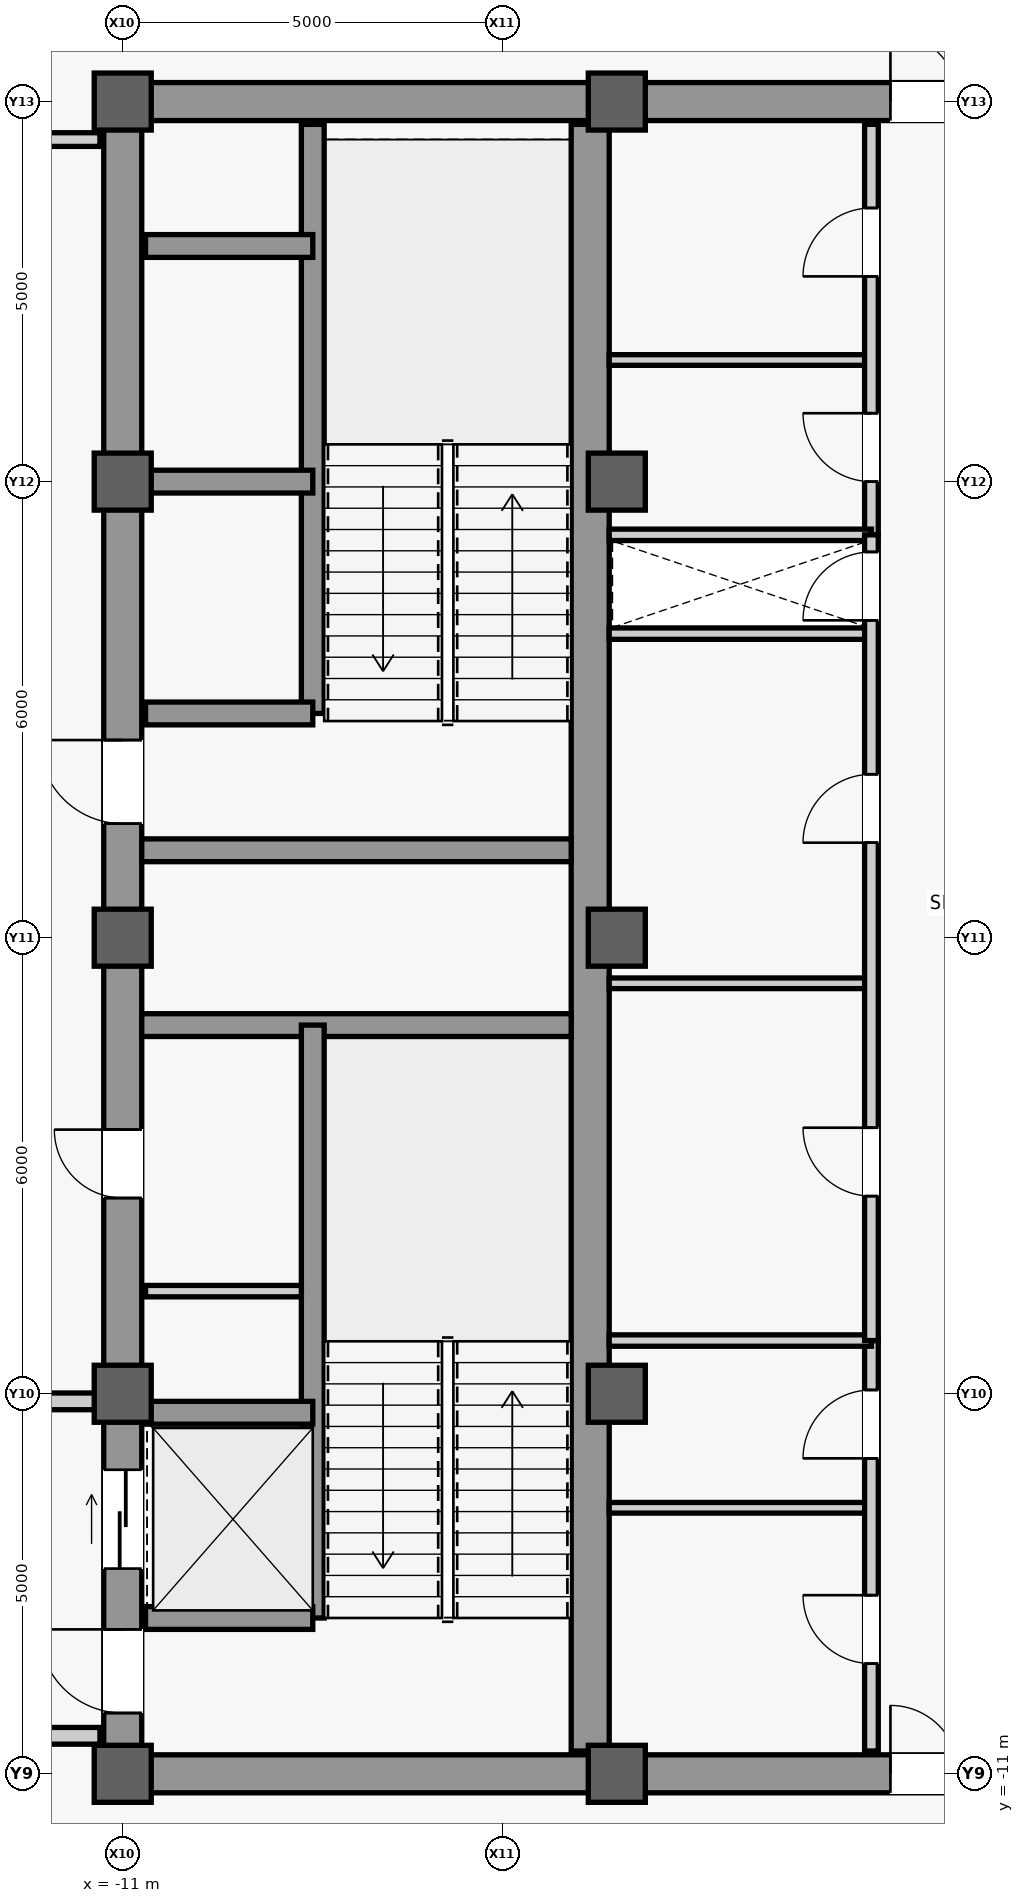
"""IFC4 building model, lengths in metres.
Left out: names, types, materials, properties, quantities, classifications, styles, units other than length and angle.
Written with IfcOpenShell. Run it as: python <this file> out.ifc"""

import sys

from ifc_helpers import new_model, si_unit, direction, frame, frame_2d, origin, origin_2d, place, context, subcontext, project, spatial, rectangle, extrude, source, transform, mapped, element, fill, save


model = new_model("IFC4")
c1 = context("Model", 3, precision=1e-05, world=origin(), true_north=direction((0.0, 1.0)))
c2 = subcontext(c1, "Body", "Model", "MODEL_VIEW")
j1 = project(units=[si_unit("LENGTHUNIT", "METRE"), si_unit("PLANEANGLEUNIT", "RADIAN")], contexts=[c1])
p1 = place(None, origin())
s1 = spatial("IfcSite", under=j1, at=p1, CompositionType="ELEMENT")
p2 = place(p1, origin())
s2 = spatial("IfcBuilding", under=s1, at=p2, CompositionType="ELEMENT")
p3 = place(p2, frame((0.0, 0.0, 394.7)))
s3 = spatial("IfcBuildingStorey", under=s2, at=p3, CompositionType="ELEMENT", Elevation=394.7)
m1 = source(origin(), c2, "Body", "SweptSolid", [
    extrude(rectangle(XDim=22.0, YDim=0.5, at=frame_2d((11.0, 0.0))), origin(), (0.0, 0.0, 1.0), 4.45),
])
p4 = place(p3, frame((-11.0, -11.0, 0.0), z_axis=(0.0, 0.0, 1.0), x_axis=(0.0, 1.0, 0.0)))
e1 = element("IfcWall", 1, at=p4, inside=s3, PredefinedType="SHEAR", context=c2, shape_type="MappedRepresentation", body=[
    mapped(m1, transform((0.0, 0.0, 0.0), scale=1.0)),
])
m2 = source(origin(), c2, "Body", "SweptSolid", [
    extrude(rectangle(XDim=1.1, YDim=2.2, at=frame_2d((0.55, 1.1))), frame((0.0, 0.26, 0.0), z_axis=(0.0, -1.0, 0.0), x_axis=(1.0, 0.0, 0.0)), (0.0, 0.0, 1.0), 0.52),
])
p5 = place(p4, frame((0.8, 0.0, 0.0)))
e2 = element("IfcOpeningElement", 2, at=p5, cuts=e1, PredefinedType="OPENING", context=c2, shape_type="MappedRepresentation", body=[
    mapped(m2, transform((0.0, 0.0, 0.0), scale=1.0)),
])
p6 = place(p4, frame((12.5, 0.0, 0.0)))
e3 = element("IfcOpeningElement", 3, at=p6, cuts=e1, PredefinedType="OPENING", context=c2, shape_type="MappedRepresentation", body=[
    mapped(m2, transform((0.0, 0.0, 0.0), scale=1.0)),
])
m3 = source(origin(), c2, "Body", "SweptSolid", [
    extrude(rectangle(XDim=0.9, YDim=2.15, at=frame_2d((0.45, 1.075))), frame((0.0, 0.26, 0.0), z_axis=(0.0, -1.0, 0.0), x_axis=(1.0, 0.0, 0.0)), (0.0, 0.0, 1.0), 0.52),
])
p7 = place(p4, frame((7.575, 0.0, 0.0)))
e4 = element("IfcOpeningElement", 4, at=p7, cuts=e1, PredefinedType="OPENING", context=c2, shape_type="MappedRepresentation", body=[
    mapped(m3, transform((0.0, 0.0, 0.0), scale=1.0)),
])
m4 = source(origin(), c2, "Body", "SweptSolid", [
    extrude(rectangle(XDim=1.3, YDim=2.3, at=frame_2d((0.65, 1.15))), frame((0.0, 0.26, 0.0), z_axis=(0.0, -1.0, 0.0), x_axis=(1.0, 0.0, 0.0)), (0.0, 0.0, 1.0), 0.52),
])
p8 = place(p4, frame((2.7, 0.0, 0.0)))
e5 = element("IfcOpeningElement", 5, at=p8, cuts=e1, PredefinedType="OPENING", context=c2, shape_type="MappedRepresentation", body=[
    mapped(m4, transform((0.0, 0.0, 0.0), scale=1.0)),
])
m5 = source(origin(), c2, "Body", "SweptSolid", [
    extrude(rectangle(XDim=21.4, YDim=0.5, at=frame_2d((10.7, 0.0))), origin(), (0.0, 0.0, 1.0), 4.45),
])
p9 = place(p3, frame((-4.85, -10.7, 0.0), z_axis=(0.0, 0.0, 1.0), x_axis=(0.0, 1.0, 0.0)))
e6 = element("IfcWall", 6, at=p9, inside=s3, PredefinedType="SHEAR", context=c2, shape_type="MappedRepresentation", body=[
    mapped(m5, transform((0.0, 0.0, 0.0), scale=1.0)),
])
m6 = source(origin(), c2, "Body", "SweptSolid", [
    extrude(rectangle(XDim=5.9, YDim=0.5, at=frame_2d((2.95, 0.0))), origin(), (0.0, 0.0, 1.0), 4.45),
])
for number, where, z_axis, x_axis in (
    (7, (-10.75, -11.0, 0.0), (0.0, 0.0, 1.0), (1.0, 0.0, 0.0)),
    (8, (-10.75, 11.0, 0.0), (0.0, 0.0, 1.0), (1.0, 0.0, 0.0)),
):
    element("IfcWall", number, at=place(p3, frame(where, z_axis=z_axis, x_axis=x_axis)), inside=s3, PredefinedType="SHEAR", context=c2, shape_type="MappedRepresentation", body=[
        mapped(m6, transform((0.0, 0.0, 0.0), scale=1.0)),
    ])
m7 = source(origin(), c2, "Body", "SweptSolid", [
    extrude(rectangle(XDim=5.65, YDim=0.3, at=frame_2d((2.825, 0.0))), origin(), (0.0, 0.0, 1.0), 4.45),
])
for number, where, z_axis, x_axis in (
    (9, (-10.75, -1.15, 0.0), (0.0, 0.0, 1.0), (1.0, 0.0, 0.0)),
    (10, (-10.75, 1.15, 0.0), (0.0, 0.0, 1.0), (1.0, 0.0, 0.0)),
):
    element("IfcWall", number, at=place(p3, frame(where, z_axis=z_axis, x_axis=x_axis)), inside=s3, PredefinedType="SHEAR", context=c2, shape_type="MappedRepresentation", body=[
        mapped(m7, transform((0.0, 0.0, 0.0), scale=1.0)),
    ])
m8 = source(origin(), c2, "Body", "SweptSolid", [
    extrude(rectangle(XDim=9.2, YDim=0.5, at=frame_2d((4.6, 0.0))), origin(), (0.0, 0.0, 1.0), 4.45),
])
p10 = place(p3, frame((-4.6, -11.0, 0.0), z_axis=(0.0, 0.0, 1.0), x_axis=(1.0, 0.0, 0.0)))
e11 = element("IfcWall", 11, at=p10, inside=s3, PredefinedType="SHEAR", context=c2, shape_type="MappedRepresentation", body=[
    mapped(m8, transform((0.0, 0.0, 0.0), scale=1.0)),
])
m9 = source(origin(), c2, "Body", "SweptSolid", [
    extrude(rectangle(XDim=1.8, YDim=2.25, at=frame_2d((0.9, 1.125))), frame((0.0, 0.26, 0.0), z_axis=(0.0, -1.0, 0.0), x_axis=(1.0, 0.0, 0.0)), (0.0, 0.0, 1.0), 0.52),
])
p11 = place(p10, frame((3.7, 0.0, 0.0)))
e12 = element("IfcOpeningElement", 12, at=p11, cuts=e11, PredefinedType="OPENING", context=c2, shape_type="MappedRepresentation", body=[
    mapped(m9, transform((0.0, 0.0, 0.0), scale=1.0)),
])
p12 = place(p3, frame((-4.6, 11.0, 0.0), z_axis=(0.0, 0.0, 1.0), x_axis=(1.0, 0.0, 0.0)))
e13 = element("IfcWall", 13, at=p12, inside=s3, PredefinedType="SHEAR", context=c2, shape_type="MappedRepresentation", body=[
    mapped(m8, transform((0.0, 0.0, 0.0), scale=1.0)),
])
p13 = place(p12, frame((3.7, 0.0, 0.0)))
e14 = element("IfcOpeningElement", 14, at=p13, cuts=e13, PredefinedType="OPENING", context=c2, shape_type="MappedRepresentation", body=[
    mapped(m9, transform((0.0, 0.0, 0.0), scale=1.0)),
])
m10 = source(origin(), c2, "Body", "SweptSolid", [
    extrude(rectangle(XDim=0.75, YDim=0.75, at=origin_2d()), origin(), (0.0, 0.0, 1.0), 4.8),
])
for number, where, z_axis, x_axis in (
    (15, (-11.0, -11.0, 0.0), (0.0, 0.0, 1.0), (1.0, 0.0, 0.0)),
    (16, (-11.0, -6.0, 0.0), (0.0, 0.0, 1.0), (1.0, 0.0, 0.0)),
    (17, (-11.0, 0.0, 0.0), (0.0, 0.0, 1.0), (1.0, 0.0, 0.0)),
    (18, (-11.0, 6.0, 0.0), (0.0, 0.0, 1.0), (1.0, 0.0, 0.0)),
    (19, (-11.0, 11.0, 0.0), (0.0, 0.0, 1.0), (1.0, 0.0, 0.0)),
    (20, (-4.5, -11.0, 0.0), (0.0, 0.0, 1.0), (1.0, 0.0, 0.0)),
    (21, (-4.5, -6.0, 0.0), (0.0, 0.0, 1.0), (1.0, 0.0, 0.0)),
    (22, (-4.5, 0.0, 0.0), (0.0, 0.0, 1.0), (1.0, 0.0, 0.0)),
    (23, (-4.5, 6.0, 0.0), (0.0, 0.0, 1.0), (1.0, 0.0, 0.0)),
    (24, (-4.5, 11.0, 0.0), (0.0, 0.0, 1.0), (1.0, 0.0, 0.0)),
):
    element("IfcColumn", number, at=place(p3, frame(where, z_axis=z_axis, x_axis=x_axis)), inside=s3, PredefinedType="COLUMN", context=c2, shape_type="MappedRepresentation", body=[
        mapped(m10, transform((0.0, 0.0, 0.0), scale=1.0)),
    ])
m11 = source(origin(), c2, "Body", "SweptSolid", [
    extrude(rectangle(XDim=7.8, YDim=0.3, at=frame_2d((3.9, 0.0))), origin(), (0.0, 0.0, 1.0), 4.45),
])
p14 = place(p3, frame((-8.5, -8.95, 0.0), z_axis=(0.0, 0.0, 1.0), x_axis=(0.0, 1.0, 0.0)))
e25 = element("IfcWall", 25, at=p14, inside=s3, PredefinedType="SHEAR", context=c2, shape_type="MappedRepresentation", body=[
    mapped(m11, transform((0.0, 0.0, 0.0), scale=1.0)),
])
m12 = source(origin(), c2, "Body", "SweptSolid", [
    extrude(rectangle(XDim=2.2, YDim=0.3, at=frame_2d((1.1, 0.0))), origin(), (0.0, 0.0, 1.0), 4.45),
])
for number, where, z_axis, x_axis in (
    (26, (-10.7, -8.95, 0.0), (0.0, 0.0, 1.0), (1.0, 0.0, 0.0)),
    (27, (-10.7, -6.25, 0.0), (0.0, 0.0, 1.0), (1.0, 0.0, 0.0)),
):
    element("IfcWall", number, at=place(p3, frame(where, z_axis=z_axis, x_axis=x_axis)), inside=s3, PredefinedType="SHEAR", context=c2, shape_type="MappedRepresentation", body=[
        mapped(m12, transform((0.0, 0.0, 0.0), scale=1.0)),
    ])
m13 = source(origin(), c2, "Body", "SweptSolid", [
    extrude(rectangle(XDim=7.75, YDim=0.3, at=frame_2d((3.875, 0.0))), origin(), (0.0, 0.0, 1.0), 4.45),
])
p15 = place(p3, frame((-8.5, 2.95, 0.0), z_axis=(0.0, 0.0, 1.0), x_axis=(0.0, 1.0, 0.0)))
e28 = element("IfcWall", 28, at=p15, inside=s3, PredefinedType="SHEAR", context=c2, shape_type="MappedRepresentation", body=[
    mapped(m13, transform((0.0, 0.0, 0.0), scale=1.0)),
])
for number, where, z_axis, x_axis in (
    (29, (-10.7, 2.95, 0.0), (0.0, 0.0, 1.0), (1.0, 0.0, 0.0)),
    (30, (-10.7, 6.0, 0.0), (0.0, 0.0, 1.0), (1.0, 0.0, 0.0)),
    (31, (-10.7, 9.1, 0.0), (0.0, 0.0, 1.0), (1.0, 0.0, 0.0)),
):
    element("IfcWall", number, at=place(p3, frame(where, z_axis=z_axis, x_axis=x_axis)), inside=s3, PredefinedType="SHEAR", context=c2, shape_type="MappedRepresentation", body=[
        mapped(m12, transform((0.0, 0.0, 0.0), scale=1.0)),
    ])
m14 = source(origin(), c2, "Body", "SweptSolid", [
    extrude(rectangle(XDim=2.05, YDim=0.15, at=frame_2d((1.025, 0.0))), origin(), (0.0, 0.0, 1.0), 4.45),
])
p16 = place(p3, frame((-10.7, -4.65, 0.0), z_axis=(0.0, 0.0, 1.0), x_axis=(1.0, 0.0, 0.0)))
e32 = element("IfcWall", 32, at=p16, inside=s3, PredefinedType="PARTITIONING", context=c2, shape_type="MappedRepresentation", body=[
    mapped(m14, transform((0.0, 0.0, 0.0), scale=1.0)),
])
m15 = source(origin(), c2, "Body", "SweptSolid", [
    extrude(rectangle(XDim=4.05, YDim=0.22, at=frame_2d((2.025, 0.0))), origin(), (0.0, 0.0, 1.0), 4.45),
])
p17 = place(p3, frame((-15.35, -10.5, 0.0), z_axis=(0.0, 0.0, 1.0), x_axis=(1.0, 0.0, 0.0)))
e33 = element("IfcWall", 33, at=p17, inside=s3, PredefinedType="PARTITIONING", context=c2, shape_type="MappedRepresentation", body=[
    mapped(m15, transform((0.0, 0.0, 0.0), scale=1.0)),
])
m16 = source(origin(), c2, "Body", "SweptSolid", [
    extrude(rectangle(XDim=4.05, YDim=0.22, at=frame_2d((2.025, 0.0))), origin(), (0.0, 0.0, 1.0), 3.901),
])
p18 = place(p3, frame((-15.35, -6.1, 0.0), z_axis=(0.0, 0.0, 1.0), x_axis=(1.0, 0.0, 0.0)))
e34 = element("IfcWall", 34, at=p18, inside=s3, PredefinedType="PARTITIONING", context=c2, shape_type="MappedRepresentation", body=[
    mapped(m16, transform((0.0, 0.0, 0.0), scale=1.0)),
])
m17 = source(origin(), c2, "Body", "SweptSolid", [
    extrude(rectangle(XDim=4.05, YDim=0.18, at=frame_2d((2.025, 0.0))), origin(), (0.0, 0.0, 1.0), 4.45),
])
p19 = place(p3, frame((-15.35, 10.5, 0.0), z_axis=(0.0, 0.0, 1.0), x_axis=(1.0, 0.0, 0.0)))
e35 = element("IfcWall", 35, at=p19, inside=s3, PredefinedType="PARTITIONING", context=c2, shape_type="MappedRepresentation", body=[
    mapped(m17, transform((0.0, 0.0, 0.0), scale=1.0)),
])
m18 = source(origin(), c2, "Body", "SweptSolid", [
    extrude(rectangle(XDim=3.45, YDim=0.15, at=frame_2d((1.725, 0.0))), origin(), (0.0, 0.0, 1.0), 4.45),
])
p20 = place(p3, frame((-4.6, 4.0, 0.0), z_axis=(0.0, 0.0, 1.0), x_axis=(1.0, 0.0, 0.0)))
e36 = element("IfcWall", 36, at=p20, inside=s3, PredefinedType="PARTITIONING", context=c2, shape_type="MappedRepresentation", body=[
    mapped(m18, transform((0.0, 0.0, 0.0), scale=1.0)),
])
m19 = source(origin(), c2, "Body", "SweptSolid", [
    extrude(rectangle(XDim=3.45, YDim=0.14, at=frame_2d((1.725, 0.0))), origin(), (0.0, 0.0, 1.0), 4.45),
])
p21 = place(p3, frame((-4.6, -7.5, 0.0), z_axis=(0.0, 0.0, 1.0), x_axis=(1.0, 0.0, 0.0)))
e37 = element("IfcWall", 37, at=p21, inside=s3, PredefinedType="PARTITIONING", context=c2, shape_type="MappedRepresentation", body=[
    mapped(m19, transform((0.0, 0.0, 0.0), scale=1.0)),
])
m20 = source(origin(), c2, "Body", "SweptSolid", [
    extrude(rectangle(XDim=5.4, YDim=0.18, at=frame_2d((2.7, 0.0))), origin(), (0.0, 0.0, 1.0), 4.45),
])
p22 = place(p3, frame((-1.15, -10.7, 0.0), z_axis=(0.0, 0.0, 1.0), x_axis=(0.0, 1.0, 0.0)))
e38 = element("IfcWall", 38, at=p22, inside=s3, PredefinedType="PARTITIONING", context=c2, shape_type="MappedRepresentation", body=[
    mapped(m20, transform((0.0, 0.0, 0.0), scale=1.0)),
])
m21 = source(origin(), c2, "Body", "SweptSolid", [
    extrude(rectangle(XDim=0.9, YDim=2.15, at=frame_2d((0.45, 1.075))), frame((0.0, 0.1, 0.0), z_axis=(0.0, -1.0, 0.0), x_axis=(1.0, 0.0, 0.0)), (0.0, 0.0, 1.0), 0.2),
])
p23 = place(p22, frame((1.15, 0.0, 0.0)))
e39 = element("IfcOpeningElement", 39, at=p23, cuts=e38, PredefinedType="OPENING", context=c2, shape_type="MappedRepresentation", body=[
    mapped(m21, transform((0.0, 0.0, 0.0), scale=1.0)),
])
p24 = place(p22, frame((3.85, 0.0, 0.0)))
e40 = element("IfcOpeningElement", 40, at=p24, cuts=e38, PredefinedType="OPENING", context=c2, shape_type="MappedRepresentation", body=[
    mapped(m21, transform((0.0, 0.0, 0.0), scale=1.0)),
])
p25 = place(p3, frame((-4.6, -5.3, 0.0), z_axis=(0.0, 0.0, 1.0), x_axis=(1.0, 0.0, 0.0)))
e41 = element("IfcWall", 41, at=p25, inside=s3, PredefinedType="PARTITIONING", context=c2, shape_type="MappedRepresentation", body=[
    mapped(m18, transform((0.0, 0.0, 0.0), scale=1.0)),
])
p26 = place(p3, frame((-4.6, 7.6, 0.0), z_axis=(0.0, 0.0, 1.0), x_axis=(1.0, 0.0, 0.0)))
e42 = element("IfcWall", 42, at=p26, inside=s3, PredefinedType="PARTITIONING", context=c2, shape_type="MappedRepresentation", body=[
    mapped(m19, transform((0.0, 0.0, 0.0), scale=1.0)),
])
p27 = place(p3, frame((-1.15, 5.3, 0.0), z_axis=(0.0, 0.0, 1.0), x_axis=(0.0, 1.0, 0.0)))
e43 = element("IfcWall", 43, at=p27, inside=s3, PredefinedType="PARTITIONING", context=c2, shape_type="MappedRepresentation", body=[
    mapped(m20, transform((0.0, 0.0, 0.0), scale=1.0)),
])
p28 = place(p27, frame((0.7, 0.0, 0.0)))
e44 = element("IfcOpeningElement", 44, at=p28, cuts=e43, PredefinedType="OPENING", context=c2, shape_type="MappedRepresentation", body=[
    mapped(m21, transform((0.0, 0.0, 0.0), scale=1.0)),
])
p29 = place(p27, frame((3.4, 0.0, 0.0)))
e45 = element("IfcOpeningElement", 45, at=p29, cuts=e43, PredefinedType="OPENING", context=c2, shape_type="MappedRepresentation", body=[
    mapped(m21, transform((0.0, 0.0, 0.0), scale=1.0)),
])
p30 = place(p3, frame((-4.6, 5.3, 0.0), z_axis=(0.0, 0.0, 1.0), x_axis=(1.0, 0.0, 0.0)))
e46 = element("IfcWall", 46, at=p30, inside=s3, PredefinedType="PARTITIONING", context=c2, shape_type="MappedRepresentation", body=[
    mapped(m18, transform((0.0, 0.0, 0.0), scale=1.0)),
])
p31 = place(p3, frame((-4.6, -0.6, 0.0), z_axis=(0.0, 0.0, 1.0), x_axis=(1.0, 0.0, 0.0)))
e47 = element("IfcWall", 47, at=p31, inside=s3, PredefinedType="PARTITIONING", context=c2, shape_type="MappedRepresentation", body=[
    mapped(m19, transform((0.0, 0.0, 0.0), scale=1.0)),
])
m22 = source(origin(), c2, "Body", "SweptSolid", [
    extrude(rectangle(XDim=10.6, YDim=0.18, at=frame_2d((5.3, 0.0))), origin(), (0.0, 0.0, 1.0), 4.45),
])
p32 = place(p3, frame((-1.15, -5.3, 0.0), z_axis=(0.0, 0.0, 1.0), x_axis=(0.0, 1.0, 0.0)))
e48 = element("IfcWall", 48, at=p32, inside=s3, PredefinedType="PARTITIONING", context=c2, shape_type="MappedRepresentation", body=[
    mapped(m22, transform((0.0, 0.0, 0.0), scale=1.0)),
])
p33 = place(p32, frame((1.9, 0.0, 0.0)))
e49 = element("IfcOpeningElement", 49, at=p33, cuts=e48, PredefinedType="OPENING", context=c2, shape_type="MappedRepresentation", body=[
    mapped(m21, transform((0.0, 0.0, 0.0), scale=1.0)),
])
p34 = place(p32, frame((6.55, 0.0, 0.0)))
e50 = element("IfcOpeningElement", 50, at=p34, cuts=e48, PredefinedType="OPENING", context=c2, shape_type="MappedRepresentation", body=[
    mapped(m21, transform((0.0, 0.0, 0.0), scale=1.0)),
])
p35 = place(p32, frame((9.475, 0.0, 0.0)))
e51 = element("IfcOpeningElement", 51, at=p35, cuts=e48, PredefinedType="OPENING", context=c2, shape_type="MappedRepresentation", body=[
    mapped(m21, transform((0.0, 0.0, 0.0), scale=1.0)),
])
m23 = source(origin(), c2, "Body", "SweptSolid", [
    extrude(rectangle(XDim=1.1, YDim=2.2, at=frame_2d((0.55, 1.1))), frame((0.0, 0.025, 0.0), z_axis=(0.0, -1.0, 0.0), x_axis=(1.0, 0.0, 0.0)), (0.0, 0.0, 1.0), 0.05),
])
p36 = place(p5, origin())
e52 = element("IfcDoor", 52, at=p36, inside=s3, OperationType="SINGLE_SWING_RIGHT", PredefinedType="DOOR", context=c2, shape_type="MappedRepresentation", body=[
    mapped(m23, transform((0.0, 0.0, 0.0), scale=1.0)),
])
fill(e2, e52)
p37 = place(p6, origin())
e53 = element("IfcDoor", 53, at=p37, inside=s3, OperationType="SINGLE_SWING_RIGHT", PredefinedType="DOOR", context=c2, shape_type="MappedRepresentation", body=[
    mapped(m23, transform((0.0, 0.0, 0.0), scale=1.0)),
])
fill(e3, e53)
m24 = source(origin(), c2, "Body", "SweptSolid", [
    extrude(rectangle(XDim=0.9, YDim=2.15, at=frame_2d((0.45, 1.075))), frame((0.0, 0.025, 0.0), z_axis=(0.0, -1.0, 0.0), x_axis=(1.0, 0.0, 0.0)), (0.0, 0.0, 1.0), 0.05),
])
p38 = place(p7, origin())
e54 = element("IfcDoor", 54, at=p38, inside=s3, OperationType="SINGLE_SWING_RIGHT", PredefinedType="DOOR", context=c2, shape_type="MappedRepresentation", body=[
    mapped(m24, transform((0.0, 0.0, 0.0), scale=1.0)),
])
fill(e4, e54)
p39 = place(p23, origin())
e55 = element("IfcDoor", 55, at=p39, inside=s3, OperationType="SINGLE_SWING_RIGHT", PredefinedType="DOOR", context=c2, shape_type="MappedRepresentation", body=[
    mapped(m24, transform((0.0, 0.0, 0.0), scale=1.0)),
])
fill(e39, e55)
p40 = place(p24, origin())
e56 = element("IfcDoor", 56, at=p40, inside=s3, OperationType="SINGLE_SWING_LEFT", PredefinedType="DOOR", context=c2, shape_type="MappedRepresentation", body=[
    mapped(m24, transform((0.0, 0.0, 0.0), scale=1.0)),
])
fill(e40, e56)
m25 = source(origin(), c2, "Body", "SweptSolid", [
    extrude(rectangle(XDim=1.8, YDim=2.25, at=frame_2d((0.9, 1.125))), frame((0.0, 0.025, 0.0), z_axis=(0.0, -1.0, 0.0), x_axis=(1.0, 0.0, 0.0)), (0.0, 0.0, 1.0), 0.05),
])
p41 = place(p11, origin())
e57 = element("IfcDoor", 57, at=p41, inside=s3, OperationType="SINGLE_SWING_LEFT", PredefinedType="DOOR", context=c2, shape_type="MappedRepresentation", body=[
    mapped(m25, transform((0.0, 0.0, 0.0), scale=1.0)),
])
fill(e12, e57)
p42 = place(p28, origin())
e58 = element("IfcDoor", 58, at=p42, inside=s3, OperationType="SINGLE_SWING_RIGHT", PredefinedType="DOOR", context=c2, shape_type="MappedRepresentation", body=[
    mapped(m24, transform((0.0, 0.0, 0.0), scale=1.0)),
])
fill(e44, e58)
p43 = place(p29, origin())
e59 = element("IfcDoor", 59, at=p43, inside=s3, OperationType="SINGLE_SWING_LEFT", PredefinedType="DOOR", context=c2, shape_type="MappedRepresentation", body=[
    mapped(m24, transform((0.0, 0.0, 0.0), scale=1.0)),
])
fill(e45, e59)
p44 = place(p13, origin())
e60 = element("IfcDoor", 60, at=p44, inside=s3, OperationType="SINGLE_SWING_RIGHT", PredefinedType="DOOR", context=c2, shape_type="MappedRepresentation", body=[
    mapped(m25, transform((0.0, 0.0, 0.0), scale=1.0)),
])
fill(e14, e60)
p45 = place(p33, origin())
e61 = element("IfcDoor", 61, at=p45, inside=s3, OperationType="SINGLE_SWING_RIGHT", PredefinedType="DOOR", context=c2, shape_type="MappedRepresentation", body=[
    mapped(m24, transform((0.0, 0.0, 0.0), scale=1.0)),
])
fill(e49, e61)
p46 = place(p34, origin())
e62 = element("IfcDoor", 62, at=p46, inside=s3, OperationType="SINGLE_SWING_LEFT", PredefinedType="DOOR", context=c2, shape_type="MappedRepresentation", body=[
    mapped(m24, transform((0.0, 0.0, 0.0), scale=1.0)),
])
fill(e50, e62)
p47 = place(p35, origin())
e63 = element("IfcDoor", 63, at=p47, inside=s3, OperationType="SINGLE_SWING_LEFT", PredefinedType="DOOR", context=c2, shape_type="MappedRepresentation", body=[
    mapped(m24, transform((0.0, 0.0, 0.0), scale=1.0)),
])
fill(e51, e63)
m26 = source(origin(), c2, "Body", "SweptSolid", [
    extrude(rectangle(XDim=1.3, YDim=2.3, at=frame_2d((0.65, 1.15))), frame((0.0, 0.025, 0.0), z_axis=(0.0, -1.0, 0.0), x_axis=(1.0, 0.0, 0.0)), (0.0, 0.0, 1.0), 0.05),
])
p48 = place(p8, origin())
e64 = element("IfcDoor", 64, at=p48, inside=s3, OperationType="SLIDING_TO_LEFT", PredefinedType="DOOR", context=c2, shape_type="MappedRepresentation", body=[
    mapped(m26, transform((0.0, 0.0, 0.0), scale=1.0)),
])
fill(e5, e64)
save(model, sys.argv[1])
